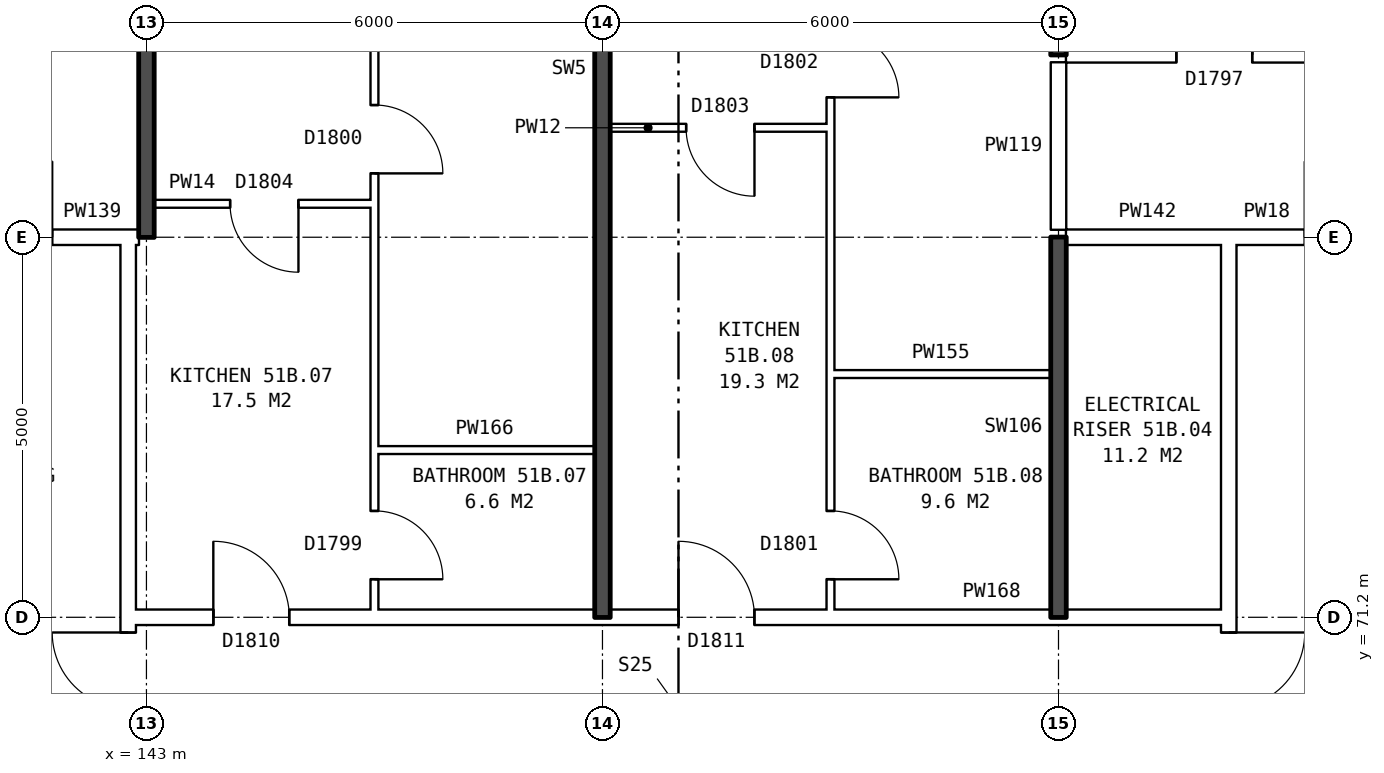
"""IFC4 building model, lengths in metres.
Left out: names, types, materials, properties, quantities, classifications, styles, units other than length and angle.
Written with IfcOpenShell. Run it as: python <this file> out.ifc"""

import sys

from ifc_helpers import new_model, si_unit, direction, frame, frame_2d, origin, place, context, subcontext, project, spatial, rectangle, extrude, element, fill, save


model = new_model("IFC4")
c1 = context("Model", 3, precision=1e-05, world=origin(), true_north=direction((0.0, 1.0)))
c2 = subcontext(c1, "Body", "Model", "MODEL_VIEW")
j1 = project(units=[si_unit("LENGTHUNIT", "METRE"), si_unit("PLANEANGLEUNIT", "RADIAN")], contexts=[c1])
p1 = place(None, origin())
s1 = spatial("IfcSite", under=j1, at=p1, CompositionType="ELEMENT")
p2 = place(p1, origin())
s2 = spatial("IfcBuilding", under=s1, at=p2, CompositionType="ELEMENT")
p3 = place(p2, frame((0.0, 0.0, 182.0)))
s3 = spatial("IfcBuildingStorey", under=s2, at=p3, CompositionType="ELEMENT", Elevation=182.0)
p4 = place(p3, frame((142.76, 63.9, 0.0), z_axis=(0.0, 0.0, 1.0), x_axis=(0.0, 1.0, 0.0)))
e1 = element("IfcWall", 1, at=p4, inside=s3, PredefinedType="PARTITIONING", context=c2, shape_type="SweptSolid", body=[
    extrude(rectangle(XDim=12.2, YDim=0.2, at=frame_2d((6.1, 0.0))), origin(), (0.0, 0.0, 1.0), 2.85),
])
p5 = place(p4, frame((5.1, 0.0, 0.0)))
e2 = element("IfcOpeningElement", 2, at=p5, cuts=e1, PredefinedType="OPENING", context=c2, shape_type="SweptSolid", body=[
    extrude(rectangle(XDim=2.0, YDim=2.1, at=frame_2d((1.0, 1.05))), frame((0.0, 0.11, 0.0), z_axis=(0.0, -1.0, 0.0), x_axis=(1.0, 0.0, 0.0)), (0.0, 0.0, 1.0), 0.22),
])
p6 = place(p3, frame((157.24, 63.9, 0.0), z_axis=(0.0, 0.0, 1.0), x_axis=(0.0, 1.0, 0.0)))
e3 = element("IfcWall", 3, at=p6, inside=s3, PredefinedType="PARTITIONING", context=c2, shape_type="SweptSolid", body=[
    extrude(rectangle(XDim=12.2, YDim=0.2, at=frame_2d((6.1, 0.0))), origin(), (0.0, 0.0, 1.0), 2.85),
])
p7 = place(p6, frame((5.1, 0.0, 0.0)))
e4 = element("IfcOpeningElement", 4, at=p7, cuts=e3, PredefinedType="OPENING", context=c2, shape_type="SweptSolid", body=[
    extrude(rectangle(XDim=2.0, YDim=2.1, at=frame_2d((1.0, 1.05))), frame((0.0, 0.11, 0.0), z_axis=(0.0, -1.0, 0.0), x_axis=(1.0, 0.0, 0.0)), (0.0, 0.0, 1.0), 0.22),
])
p8 = place(p3, frame((142.76, 71.2, 0.0), z_axis=(0.0, 0.0, 1.0), x_axis=(1.0, 0.0, 0.0)))
e5 = element("IfcWall", 5, at=p8, inside=s3, PredefinedType="PARTITIONING", context=c2, shape_type="SweptSolid", body=[
    extrude(rectangle(XDim=14.48, YDim=0.2, at=frame_2d((7.24, 0.0))), origin(), (0.0, 0.0, 1.0), 2.85),
])
p9 = place(p8, frame((1.12, 0.0, 0.0)))
e6 = element("IfcOpeningElement", 6, at=p9, cuts=e5, PredefinedType="OPENING", context=c2, shape_type="SweptSolid", body=[
    extrude(rectangle(XDim=1.0, YDim=2.1, at=frame_2d((0.5, 1.05))), frame((0.0, 0.11, 0.0), z_axis=(0.0, -1.0, 0.0), x_axis=(1.0, 0.0, 0.0)), (0.0, 0.0, 1.0), 0.22),
])
p10 = place(p8, frame((7.24, 0.0, 0.0)))
e7 = element("IfcOpeningElement", 7, at=p10, cuts=e5, PredefinedType="OPENING", context=c2, shape_type="SweptSolid", body=[
    extrude(rectangle(XDim=1.0, YDim=2.1, at=frame_2d((0.5, 1.05))), frame((0.0, 0.11, 0.0), z_axis=(0.0, -1.0, 0.0), x_axis=(1.0, 0.0, 0.0)), (0.0, 0.0, 1.0), 0.22),
])
for number, where, z_axis, x_axis in (
    (8, (146.0, 73.4, 0.0), (0.0, 0.0, 1.0), (1.0, 0.0, 0.0)),
    (9, (152.0, 74.4, 0.0), (0.0, 0.0, 1.0), (1.0, 0.0, 0.0)),
):
    element("IfcWall", number, at=place(p3, frame(where, z_axis=z_axis, x_axis=x_axis)), inside=s3, PredefinedType="PARTITIONING", context=c2, shape_type="SweptSolid", body=[
        extrude(rectangle(XDim=2.9, YDim=0.1, at=frame_2d((1.45, 0.0))), origin(), (0.0, 0.0, 1.0), 2.85),
    ])
p11 = place(p3, frame((139.76, 76.2, 0.0), z_axis=(0.0, 0.0, 1.0), x_axis=(1.0, 0.0, 0.0)))
e10 = element("IfcWall", 10, at=p11, inside=s3, PredefinedType="PARTITIONING", context=c2, shape_type="SweptSolid", body=[
    extrude(rectangle(XDim=3.0, YDim=0.2, at=frame_2d((1.5, 0.0))), origin(), (0.0, 0.0, 1.0), 2.85),
])
p12 = place(p11, frame((1.0, 0.0, 0.0)))
e11 = element("IfcOpeningElement", 11, at=p12, cuts=e10, PredefinedType="OPENING", context=c2, shape_type="SweptSolid", body=[
    extrude(rectangle(XDim=1.0, YDim=2.1, at=frame_2d((0.5, 1.05))), frame((0.0, 0.11, 0.0), z_axis=(0.0, -1.0, 0.0), x_axis=(1.0, 0.0, 0.0)), (0.0, 0.0, 1.0), 0.22),
])
p13 = place(p3, frame((142.76, 76.2, 0.0), z_axis=(0.0, 0.0, 1.0), x_axis=(1.0, 0.0, 0.0)))
e12 = element("IfcWall", 12, at=p13, inside=s3, PredefinedType="PARTITIONING", context=c2, shape_type="SweptSolid", body=[
    extrude(rectangle(XDim=0.14, YDim=0.2, at=frame_2d((0.07, 0.0))), origin(), (0.0, 0.0, 1.0), 2.85),
])
p14 = place(p3, frame((155.1, 76.2, 0.0), z_axis=(0.0, 0.0, 1.0), x_axis=(1.0, 0.0, 0.0)))
e13 = element("IfcWall", 13, at=p14, inside=s3, PredefinedType="PARTITIONING", context=c2, shape_type="SweptSolid", body=[
    extrude(rectangle(XDim=2.14, YDim=0.2, at=frame_2d((1.07, 0.0))), origin(), (0.0, 0.0, 1.0), 2.85),
])
p15 = place(p3, frame((157.24, 76.2, 0.0), z_axis=(0.0, 0.0, 1.0), x_axis=(1.0, 0.0, 0.0)))
e14 = element("IfcWall", 14, at=p15, inside=s3, PredefinedType="PARTITIONING", context=c2, shape_type="SweptSolid", body=[
    extrude(rectangle(XDim=3.0, YDim=0.2, at=frame_2d((1.5, 0.0))), origin(), (0.0, 0.0, 1.0), 2.85),
])
p16 = place(p15, frame((1.0, 0.0, 0.0)))
e15 = element("IfcOpeningElement", 15, at=p16, cuts=e14, PredefinedType="OPENING", context=c2, shape_type="SweptSolid", body=[
    extrude(rectangle(XDim=1.0, YDim=2.1, at=frame_2d((0.5, 1.05))), frame((0.0, 0.11, 0.0), z_axis=(0.0, -1.0, 0.0), x_axis=(1.0, 0.0, 0.0)), (0.0, 0.0, 1.0), 0.22),
])
p17 = place(p3, frame((143.1, 76.64, 0.0), z_axis=(0.0, 0.0, 1.0), x_axis=(1.0, 0.0, 0.0)))
e16 = element("IfcWall", 16, at=p17, inside=s3, PredefinedType="PARTITIONING", context=c2, shape_type="SweptSolid", body=[
    extrude(rectangle(XDim=2.9, YDim=0.1, at=frame_2d((1.45, 0.0))), origin(), (0.0, 0.0, 1.0), 2.85),
])
p18 = place(p17, frame((1.0, 0.0, 0.0)))
e17 = element("IfcOpeningElement", 17, at=p18, cuts=e16, PredefinedType="OPENING", context=c2, shape_type="SweptSolid", body=[
    extrude(rectangle(XDim=0.9, YDim=2.1, at=frame_2d((0.45, 1.05))), frame((0.0, 0.06, 0.0), z_axis=(0.0, -1.0, 0.0), x_axis=(1.0, 0.0, 0.0)), (0.0, 0.0, 1.0), 0.12),
])
p19 = place(p3, frame((149.1, 77.64, 0.0), z_axis=(0.0, 0.0, 1.0), x_axis=(1.0, 0.0, 0.0)))
e18 = element("IfcWall", 18, at=p19, inside=s3, PredefinedType="PARTITIONING", context=c2, shape_type="SweptSolid", body=[
    extrude(rectangle(XDim=2.9, YDim=0.1, at=frame_2d((1.45, 0.0))), origin(), (0.0, 0.0, 1.0), 2.85),
])
p20 = place(p19, frame((1.0, 0.0, 0.0)))
e19 = element("IfcOpeningElement", 19, at=p20, cuts=e18, PredefinedType="OPENING", context=c2, shape_type="SweptSolid", body=[
    extrude(rectangle(XDim=0.9, YDim=2.1, at=frame_2d((0.45, 1.05))), frame((0.0, 0.06, 0.0), z_axis=(0.0, -1.0, 0.0), x_axis=(1.0, 0.0, 0.0)), (0.0, 0.0, 1.0), 0.12),
])
p21 = place(p3, frame((155.1, 78.6, 0.0), z_axis=(0.0, 0.0, 1.0), x_axis=(1.0, 0.0, 0.0)))
e20 = element("IfcWall", 20, at=p21, inside=s3, PredefinedType="PARTITIONING", context=c2, shape_type="SweptSolid", body=[
    extrude(rectangle(XDim=14.79, YDim=0.2, at=frame_2d((7.395, 0.0))), origin(), (0.0, 0.0, 1.0), 2.85),
])
p22 = place(p21, frame((1.45, 0.0, 0.0)))
e21 = element("IfcOpeningElement", 21, at=p22, cuts=e20, PredefinedType="OPENING", context=c2, shape_type="SweptSolid", body=[
    extrude(rectangle(XDim=1.0, YDim=2.1, at=frame_2d((0.5, 1.05))), frame((0.0, 0.11, 0.0), z_axis=(0.0, -1.0, 0.0), x_axis=(1.0, 0.0, 0.0)), (0.0, 0.0, 1.0), 0.22),
])
p23 = place(p21, frame((11.045, 0.0, 0.0)))
e22 = element("IfcOpeningElement", 22, at=p23, cuts=e20, PredefinedType="OPENING", context=c2, shape_type="SweptSolid", body=[
    extrude(rectangle(XDim=1.0, YDim=2.1, at=frame_2d((0.5, 1.05))), frame((0.0, 0.11, 0.0), z_axis=(0.0, -1.0, 0.0), x_axis=(1.0, 0.0, 0.0)), (0.0, 0.0, 1.0), 0.22),
])
p24 = place(p3, frame((143.0, 76.2, 0.0), z_axis=(0.0, 0.0, 1.0), x_axis=(0.0, 1.0, 0.0)))
e23 = element("IfcWall", 23, at=p24, inside=s3, PredefinedType="SOLIDWALL", context=c2, shape_type="SweptSolid", body=[
    extrude(rectangle(XDim=9.44, YDim=0.2, at=frame_2d((4.72, 0.0))), origin(), (0.0, 0.0, 1.0), 2.85),
])
p25 = place(p3, frame((146.0, 71.3, 0.0), z_axis=(0.0, 0.0, 1.0), x_axis=(0.0, 1.0, 0.0)))
e24 = element("IfcWall", 24, at=p25, inside=s3, PredefinedType="PARTITIONING", context=c2, shape_type="SweptSolid", body=[
    extrude(rectangle(XDim=14.34, YDim=0.1, at=frame_2d((7.17, 0.0))), origin(), (0.0, 0.0, 1.0), 2.85),
])
p26 = place(p25, frame((5.74, 0.0, 0.0)))
e25 = element("IfcOpeningElement", 25, at=p26, cuts=e24, PredefinedType="OPENING", context=c2, shape_type="SweptSolid", body=[
    extrude(rectangle(XDim=0.9, YDim=2.1, at=frame_2d((0.45, 1.05))), frame((0.0, 0.06, 0.0), z_axis=(0.0, -1.0, 0.0), x_axis=(1.0, 0.0, 0.0)), (0.0, 0.0, 1.0), 0.12),
])
p27 = place(p25, frame((0.4, 0.0, 0.0)))
e26 = element("IfcOpeningElement", 26, at=p27, cuts=e24, PredefinedType="OPENING", context=c2, shape_type="SweptSolid", body=[
    extrude(rectangle(XDim=0.9, YDim=2.1, at=frame_2d((0.45, 1.05))), frame((0.0, 0.06, 0.0), z_axis=(0.0, -1.0, 0.0), x_axis=(1.0, 0.0, 0.0)), (0.0, 0.0, 1.0), 0.12),
])
p28 = place(p3, frame((149.0, 71.2, 0.0), z_axis=(0.0, 0.0, 1.0), x_axis=(0.0, 1.0, 0.0)))
e27 = element("IfcWall", 27, at=p28, inside=s3, PredefinedType="SOLIDWALL", context=c2, shape_type="SweptSolid", body=[
    extrude(rectangle(XDim=14.44, YDim=0.2, at=frame_2d((7.22, 0.0))), origin(), (0.0, 0.0, 1.0), 2.85),
])
p29 = place(p3, frame((152.0, 71.3, 0.0), z_axis=(0.0, 0.0, 1.0), x_axis=(0.0, 1.0, 0.0)))
e28 = element("IfcWall", 28, at=p29, inside=s3, PredefinedType="PARTITIONING", context=c2, shape_type="SweptSolid", body=[
    extrude(rectangle(XDim=14.34, YDim=0.1, at=frame_2d((7.17, 0.0))), origin(), (0.0, 0.0, 1.0), 2.85),
])
p30 = place(p29, frame((6.74, 0.0, 0.0)))
e29 = element("IfcOpeningElement", 29, at=p30, cuts=e28, PredefinedType="OPENING", context=c2, shape_type="SweptSolid", body=[
    extrude(rectangle(XDim=0.9, YDim=2.1, at=frame_2d((0.45, 1.05))), frame((0.0, 0.06, 0.0), z_axis=(0.0, -1.0, 0.0), x_axis=(1.0, 0.0, 0.0)), (0.0, 0.0, 1.0), 0.12),
])
p31 = place(p29, frame((0.4, 0.0, 0.0)))
e30 = element("IfcOpeningElement", 30, at=p31, cuts=e28, PredefinedType="OPENING", context=c2, shape_type="SweptSolid", body=[
    extrude(rectangle(XDim=0.9, YDim=2.1, at=frame_2d((0.45, 1.05))), frame((0.0, 0.06, 0.0), z_axis=(0.0, -1.0, 0.0), x_axis=(1.0, 0.0, 0.0)), (0.0, 0.0, 1.0), 0.12),
])
p32 = place(p3, frame((155.0, 71.2, 0.0), z_axis=(0.0, 0.0, 1.0), x_axis=(0.0, 1.0, 0.0)))
e31 = element("IfcWall", 31, at=p32, inside=s3, PredefinedType="SOLIDWALL", context=c2, shape_type="SweptSolid", body=[
    extrude(rectangle(XDim=5.0, YDim=0.2, at=frame_2d((2.5, 0.0))), origin(), (0.0, 0.0, 1.0), 2.85),
])
p33 = place(p3, frame((155.0, 76.3, 0.0), z_axis=(0.0, 0.0, 1.0), x_axis=(0.0, 1.0, 0.0)))
e32 = element("IfcWall", 32, at=p33, inside=s3, PredefinedType="PARTITIONING", context=c2, shape_type="SweptSolid", body=[
    extrude(rectangle(XDim=2.2, YDim=0.2, at=frame_2d((1.1, 0.0))), origin(), (0.0, 0.0, 1.0), 2.85),
])
p34 = place(p3, frame((155.0, 78.6, 0.0), z_axis=(0.0, 0.0, 1.0), x_axis=(0.0, 1.0, 0.0)))
e33 = element("IfcWall", 33, at=p34, inside=s3, PredefinedType="SOLIDWALL", context=c2, shape_type="SweptSolid", body=[
    extrude(rectangle(XDim=7.04, YDim=0.2, at=frame_2d((3.52, 0.0))), origin(), (0.0, 0.0, 1.0), 2.85),
])
p35 = place(p5, origin())
e34 = element("IfcDoor", 34, at=p35, inside=s3, OperationType="DOUBLE_DOOR_SINGLE_SWING", PredefinedType="DOOR", context=c2, shape_type="SweptSolid", body=[
    extrude(rectangle(XDim=2.0, YDim=2.1, at=frame_2d((1.0, 1.05))), frame((0.0, 0.025, 0.0), z_axis=(0.0, -1.0, 0.0), x_axis=(1.0, 0.0, 0.0)), (0.0, 0.0, 1.0), 0.05),
])
fill(e2, e34)
p36 = place(p7, frame((2.0, 0.0, 0.0), z_axis=(0.0, 0.0, 1.0), x_axis=(-1.0, 0.0, 0.0)))
e35 = element("IfcDoor", 35, at=p36, inside=s3, OperationType="DOUBLE_DOOR_SINGLE_SWING", PredefinedType="DOOR", context=c2, shape_type="SweptSolid", body=[
    extrude(rectangle(XDim=2.0, YDim=2.1, at=frame_2d((1.0, 1.05))), frame((0.0, 0.025, 0.0), z_axis=(0.0, -1.0, 0.0), x_axis=(1.0, 0.0, 0.0)), (0.0, 0.0, 1.0), 0.05),
])
fill(e4, e35)
p37 = place(p26, frame((0.9, 0.0, 0.0), z_axis=(0.0, 0.0, 1.0), x_axis=(-1.0, 0.0, 0.0)))
e36 = element("IfcDoor", 36, at=p37, inside=s3, OperationType="SINGLE_SWING_RIGHT", PredefinedType="DOOR", context=c2, shape_type="SweptSolid", body=[
    extrude(rectangle(XDim=0.9, YDim=2.1, at=frame_2d((0.45, 1.05))), frame((0.0, 0.025, 0.0), z_axis=(0.0, -1.0, 0.0), x_axis=(1.0, 0.0, 0.0)), (0.0, 0.0, 1.0), 0.05),
])
fill(e25, e36)
p38 = place(p9, origin())
e37 = element("IfcDoor", 37, at=p38, inside=s3, OperationType="SINGLE_SWING_LEFT", PredefinedType="DOOR", context=c2, shape_type="SweptSolid", body=[
    extrude(rectangle(XDim=1.0, YDim=2.1, at=frame_2d((0.5, 1.05))), frame((0.0, 0.025, 0.0), z_axis=(0.0, -1.0, 0.0), x_axis=(1.0, 0.0, 0.0)), (0.0, 0.0, 1.0), 0.05),
])
fill(e6, e37)
p39 = place(p18, frame((0.9, 0.0, 0.0), z_axis=(0.0, 0.0, 1.0), x_axis=(-1.0, 0.0, 0.0)))
e38 = element("IfcDoor", 38, at=p39, inside=s3, OperationType="SINGLE_SWING_LEFT", PredefinedType="DOOR", context=c2, shape_type="SweptSolid", body=[
    extrude(rectangle(XDim=0.9, YDim=2.1, at=frame_2d((0.45, 1.05))), frame((0.0, 0.025, 0.0), z_axis=(0.0, -1.0, 0.0), x_axis=(1.0, 0.0, 0.0)), (0.0, 0.0, 1.0), 0.05),
])
fill(e17, e38)
p40 = place(p27, frame((0.9, 0.0, 0.0), z_axis=(0.0, 0.0, 1.0), x_axis=(-1.0, 0.0, 0.0)))
e39 = element("IfcDoor", 39, at=p40, inside=s3, OperationType="SINGLE_SWING_RIGHT", PredefinedType="DOOR", context=c2, shape_type="SweptSolid", body=[
    extrude(rectangle(XDim=0.9, YDim=2.1, at=frame_2d((0.45, 1.05))), frame((0.0, 0.025, 0.0), z_axis=(0.0, -1.0, 0.0), x_axis=(1.0, 0.0, 0.0)), (0.0, 0.0, 1.0), 0.05),
])
fill(e26, e39)
p41 = place(p30, frame((0.9, 0.0, 0.0), z_axis=(0.0, 0.0, 1.0), x_axis=(-1.0, 0.0, 0.0)))
e40 = element("IfcDoor", 40, at=p41, inside=s3, OperationType="SINGLE_SWING_RIGHT", PredefinedType="DOOR", context=c2, shape_type="SweptSolid", body=[
    extrude(rectangle(XDim=0.9, YDim=2.1, at=frame_2d((0.45, 1.05))), frame((0.0, 0.025, 0.0), z_axis=(0.0, -1.0, 0.0), x_axis=(1.0, 0.0, 0.0)), (0.0, 0.0, 1.0), 0.05),
])
fill(e29, e40)
p42 = place(p10, origin())
e41 = element("IfcDoor", 41, at=p42, inside=s3, OperationType="SINGLE_SWING_LEFT", PredefinedType="DOOR", context=c2, shape_type="SweptSolid", body=[
    extrude(rectangle(XDim=1.0, YDim=2.1, at=frame_2d((0.5, 1.05))), frame((0.0, 0.025, 0.0), z_axis=(0.0, -1.0, 0.0), x_axis=(1.0, 0.0, 0.0)), (0.0, 0.0, 1.0), 0.05),
])
fill(e7, e41)
p43 = place(p20, frame((0.9, 0.0, 0.0), z_axis=(0.0, 0.0, 1.0), x_axis=(-1.0, 0.0, 0.0)))
e42 = element("IfcDoor", 42, at=p43, inside=s3, OperationType="SINGLE_SWING_LEFT", PredefinedType="DOOR", context=c2, shape_type="SweptSolid", body=[
    extrude(rectangle(XDim=0.9, YDim=2.1, at=frame_2d((0.45, 1.05))), frame((0.0, 0.025, 0.0), z_axis=(0.0, -1.0, 0.0), x_axis=(1.0, 0.0, 0.0)), (0.0, 0.0, 1.0), 0.05),
])
fill(e19, e42)
p44 = place(p31, frame((0.9, 0.0, 0.0), z_axis=(0.0, 0.0, 1.0), x_axis=(-1.0, 0.0, 0.0)))
e43 = element("IfcDoor", 43, at=p44, inside=s3, OperationType="SINGLE_SWING_RIGHT", PredefinedType="DOOR", context=c2, shape_type="SweptSolid", body=[
    extrude(rectangle(XDim=0.9, YDim=2.1, at=frame_2d((0.45, 1.05))), frame((0.0, 0.025, 0.0), z_axis=(0.0, -1.0, 0.0), x_axis=(1.0, 0.0, 0.0)), (0.0, 0.0, 1.0), 0.05),
])
fill(e30, e43)
p45 = place(p22, origin())
e44 = element("IfcDoor", 44, at=p45, inside=s3, OperationType="SINGLE_SWING_RIGHT", PredefinedType="DOOR", context=c2, shape_type="SweptSolid", body=[
    extrude(rectangle(XDim=1.0, YDim=2.1, at=frame_2d((0.5, 1.05))), frame((0.0, 0.025, 0.0), z_axis=(0.0, -1.0, 0.0), x_axis=(1.0, 0.0, 0.0)), (0.0, 0.0, 1.0), 0.05),
])
fill(e21, e44)
save(model, sys.argv[1])
